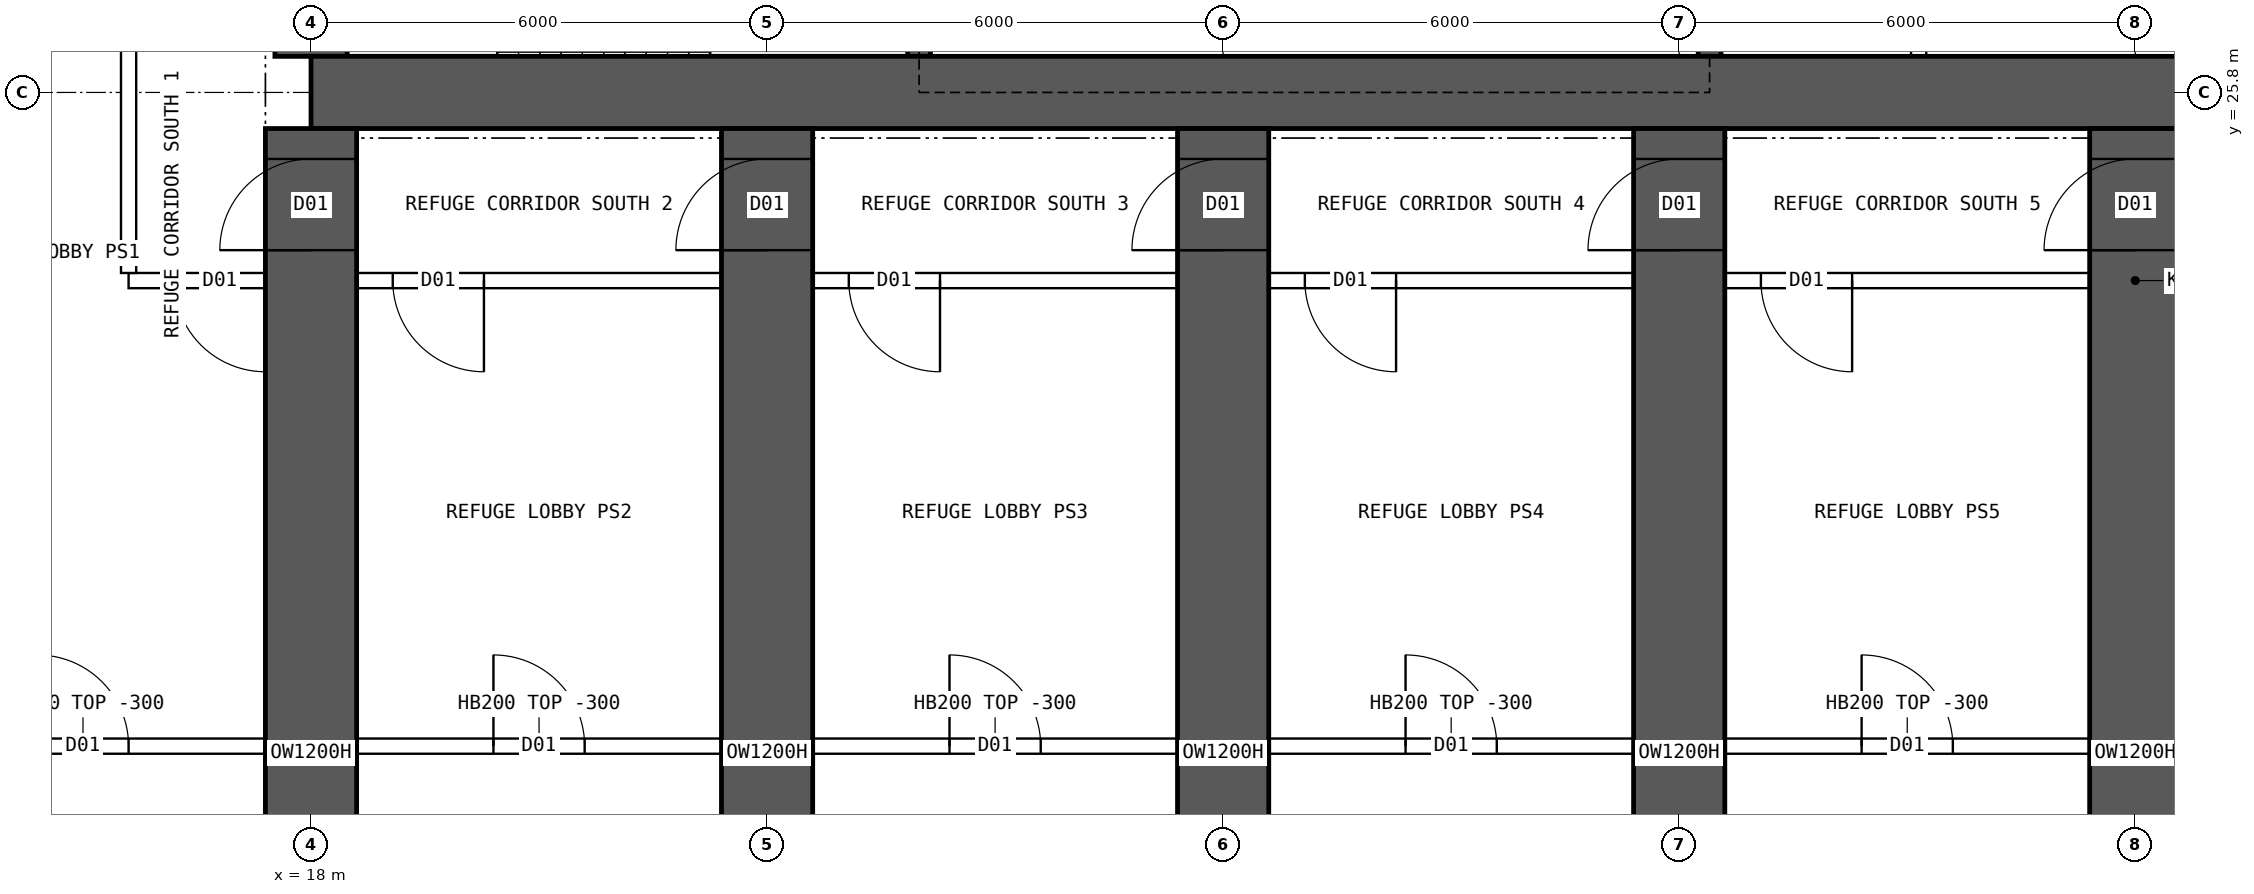
"""IFC4 building model, lengths in metres.
Left out: names, types, materials, properties, quantities, classifications, styles, units other than length and angle.
Written with IfcOpenShell. Run it as: python <this file> out.ifc"""

import sys

from ifc_helpers import new_model, si_unit, direction, frame, frame_2d, origin, place, context, subcontext, project, spatial, rectangle, extrude, element, fill, save


model = new_model("IFC4")
c1 = context("Model", 3, precision=1e-05, world=origin(), true_north=direction((0.0, 1.0)))
c2 = subcontext(c1, "Body", "Model", "MODEL_VIEW")
j1 = project(units=[si_unit("LENGTHUNIT", "METRE"), si_unit("PLANEANGLEUNIT", "RADIAN")], contexts=[c1])
p1 = place(None, origin())
s1 = spatial("IfcSite", under=j1, at=p1, CompositionType="ELEMENT")
p2 = place(p1, origin())
s2 = spatial("IfcBuilding", under=s1, at=p2, CompositionType="ELEMENT")
p3 = place(p2, frame((0.0, 0.0, 133.15)))
s3 = spatial("IfcBuildingStorey", under=s2, at=p3, CompositionType="ELEMENT", Elevation=133.15)
p4 = place(p3, frame((18.0, 25.8, 0.0), z_axis=(0.0, 0.0, 1.0), x_axis=(1.0, 0.0, 0.0)))
e1 = element("IfcWall", 1, at=p4, inside=s3, PredefinedType="SHEAR", context=c2, shape_type="SweptSolid", body=[
    extrude(rectangle(XDim=48.0, YDim=0.95, at=frame_2d((24.0, 0.0))), origin(), (0.0, 0.0, 1.0), 7.2),
])
p5 = place(p3, frame((18.0, 26.275, 0.0), z_axis=(0.0, 0.0, 1.0), x_axis=(0.0, 1.0, 0.0)))
e2 = element("IfcWall", 2, at=p5, inside=s3, PredefinedType="SHEAR", context=c2, shape_type="SweptSolid", body=[
    extrude(rectangle(XDim=11.45, YDim=0.95, at=frame_2d((5.725, 0.0))), origin(), (0.0, 0.0, 1.0), 7.2),
])
p6 = place(p5, frame((5.025, 0.0, 0.0)))
e3 = element("IfcOpeningElement", 3, at=p6, cuts=e2, PredefinedType="OPENING", context=c2, shape_type="SweptSolid", body=[
    extrude(rectangle(XDim=1.2, YDim=2.1, at=frame_2d((0.6, 1.05))), frame((0.0, 0.485, 0.0), z_axis=(0.0, -1.0, 0.0), x_axis=(1.0, 0.0, 0.0)), (0.0, 0.0, 1.0), 0.97),
])
for number, where, z_axis, x_axis in (
    (4, (26.0, 26.275, 0.0), (0.0, 0.0, 1.0), (0.0, 1.0, 0.0)),
    (5, (36.4, 26.275, 0.0), (0.0, 0.0, 1.0), (0.0, 1.0, 0.0)),
):
    element("IfcWall", number, at=place(p3, frame(where, z_axis=z_axis, x_axis=x_axis)), inside=s3, PredefinedType="SHEAR", context=c2, shape_type="SweptSolid", body=[
        extrude(rectangle(XDim=3.975, YDim=0.3, at=frame_2d((1.988, 0.0))), origin(), (0.0, 0.0, 1.0), 7.2),
    ])
p7 = place(p3, frame((18.0, 8.9, 0.0), z_axis=(0.0, 0.0, 1.0), x_axis=(0.0, 1.0, 0.0)))
e6 = element("IfcWall", 6, at=p7, inside=s3, PredefinedType="SHEAR", context=c2, shape_type="SweptSolid", body=[
    extrude(rectangle(XDim=16.425, YDim=1.2, at=frame_2d((8.212, 0.0))), origin(), (0.0, 0.0, 1.0), 7.2),
])
p8 = place(p7, frame((14.825, 0.0, 0.0)))
e7 = element("IfcOpeningElement", 7, at=p8, cuts=e6, PredefinedType="OPENING", context=c2, shape_type="SweptSolid", body=[
    extrude(rectangle(XDim=1.2, YDim=2.1, at=frame_2d((0.6, 1.05))), frame((0.0, 0.61, 0.0), z_axis=(0.0, -1.0, 0.0), x_axis=(1.0, 0.0, 0.0)), (0.0, 0.0, 1.0), 1.22),
])
p9 = place(p3, frame((24.0, 8.9, 0.0), z_axis=(0.0, 0.0, 1.0), x_axis=(0.0, 1.0, 0.0)))
e8 = element("IfcWall", 8, at=p9, inside=s3, PredefinedType="SHEAR", context=c2, shape_type="SweptSolid", body=[
    extrude(rectangle(XDim=16.425, YDim=1.2, at=frame_2d((8.212, 0.0))), origin(), (0.0, 0.0, 1.0), 7.2),
])
p10 = place(p9, frame((14.825, 0.0, 0.0)))
e9 = element("IfcOpeningElement", 9, at=p10, cuts=e8, PredefinedType="OPENING", context=c2, shape_type="SweptSolid", body=[
    extrude(rectangle(XDim=1.2, YDim=2.1, at=frame_2d((0.6, 1.05))), frame((0.0, 0.61, 0.0), z_axis=(0.0, -1.0, 0.0), x_axis=(1.0, 0.0, 0.0)), (0.0, 0.0, 1.0), 1.22),
])
p11 = place(p3, frame((30.0, 8.9, 0.0), z_axis=(0.0, 0.0, 1.0), x_axis=(0.0, 1.0, 0.0)))
e10 = element("IfcWall", 10, at=p11, inside=s3, PredefinedType="SHEAR", context=c2, shape_type="SweptSolid", body=[
    extrude(rectangle(XDim=16.425, YDim=1.2, at=frame_2d((8.212, 0.0))), origin(), (0.0, 0.0, 1.0), 7.2),
])
p12 = place(p11, frame((14.825, 0.0, 0.0)))
e11 = element("IfcOpeningElement", 11, at=p12, cuts=e10, PredefinedType="OPENING", context=c2, shape_type="SweptSolid", body=[
    extrude(rectangle(XDim=1.2, YDim=2.1, at=frame_2d((0.6, 1.05))), frame((0.0, 0.61, 0.0), z_axis=(0.0, -1.0, 0.0), x_axis=(1.0, 0.0, 0.0)), (0.0, 0.0, 1.0), 1.22),
])
p13 = place(p3, frame((36.0, 8.9, 0.0), z_axis=(0.0, 0.0, 1.0), x_axis=(0.0, 1.0, 0.0)))
e12 = element("IfcWall", 12, at=p13, inside=s3, PredefinedType="SHEAR", context=c2, shape_type="SweptSolid", body=[
    extrude(rectangle(XDim=16.425, YDim=1.2, at=frame_2d((8.212, 0.0))), origin(), (0.0, 0.0, 1.0), 7.2),
])
p14 = place(p13, frame((14.825, 0.0, 0.0)))
e13 = element("IfcOpeningElement", 13, at=p14, cuts=e12, PredefinedType="OPENING", context=c2, shape_type="SweptSolid", body=[
    extrude(rectangle(XDim=1.2, YDim=2.1, at=frame_2d((0.6, 1.05))), frame((0.0, 0.61, 0.0), z_axis=(0.0, -1.0, 0.0), x_axis=(1.0, 0.0, 0.0)), (0.0, 0.0, 1.0), 1.22),
])
p15 = place(p3, frame((42.0, 8.9, 0.0), z_axis=(0.0, 0.0, 1.0), x_axis=(0.0, 1.0, 0.0)))
e14 = element("IfcWall", 14, at=p15, inside=s3, PredefinedType="SHEAR", context=c2, shape_type="SweptSolid", body=[
    extrude(rectangle(XDim=16.425, YDim=1.2, at=frame_2d((8.212, 0.0))), origin(), (0.0, 0.0, 1.0), 7.2),
])
p16 = place(p15, frame((14.825, 0.0, 0.0)))
e15 = element("IfcOpeningElement", 15, at=p16, cuts=e14, PredefinedType="OPENING", context=c2, shape_type="SweptSolid", body=[
    extrude(rectangle(XDim=1.2, YDim=2.1, at=frame_2d((0.6, 1.05))), frame((0.0, 0.61, 0.0), z_axis=(0.0, -1.0, 0.0), x_axis=(1.0, 0.0, 0.0)), (0.0, 0.0, 1.0), 1.22),
])
p17 = place(p3, frame((39.15, 26.275, 0.0), z_axis=(0.0, 0.0, 1.0), x_axis=(0.0, 1.0, 0.0)))
e16 = element("IfcWall", 16, at=p17, inside=s3, PredefinedType="SOLIDWALL", context=c2, shape_type="SweptSolid", body=[
    extrude(rectangle(XDim=3.975, YDim=0.2, at=frame_2d((1.988, 0.0))), origin(), (0.0, 0.0, 1.0), 6.9),
])
p18 = place(p3, frame((68.4, 23.325, 0.0), z_axis=(0.0, 0.0, 1.0), x_axis=(-1.0, 0.0, 0.0)))
e17 = element("IfcWall", 17, at=p18, inside=s3, PredefinedType="SOLIDWALL", context=c2, shape_type="SweptSolid", body=[
    extrude(rectangle(XDim=52.8, YDim=0.2, at=frame_2d((26.4, 0.0))), origin(), (0.0, 0.0, 1.0), 6.9),
])
p19 = place(p18, frame((51.0, 0.0, 0.0)))
e18 = element("IfcOpeningElement", 18, at=p19, cuts=e17, PredefinedType="OPENING", context=c2, shape_type="SweptSolid", body=[
    extrude(rectangle(XDim=1.2, YDim=2.1, at=frame_2d((0.6, 1.05))), frame((0.0, 0.11, 0.0), z_axis=(0.0, -1.0, 0.0), x_axis=(1.0, 0.0, 0.0)), (0.0, 0.0, 1.0), 0.22),
])
p20 = place(p18, frame((48.125, 0.0, 0.0)))
e19 = element("IfcOpeningElement", 19, at=p20, cuts=e17, PredefinedType="OPENING", context=c2, shape_type="SweptSolid", body=[
    extrude(rectangle(XDim=1.2, YDim=2.1, at=frame_2d((0.6, 1.05))), frame((0.0, 0.11, 0.0), z_axis=(0.0, -1.0, 0.0), x_axis=(1.0, 0.0, 0.0)), (0.0, 0.0, 1.0), 0.22),
])
p21 = place(p18, frame((42.125, 0.0, 0.0)))
e20 = element("IfcOpeningElement", 20, at=p21, cuts=e17, PredefinedType="OPENING", context=c2, shape_type="SweptSolid", body=[
    extrude(rectangle(XDim=1.2, YDim=2.1, at=frame_2d((0.6, 1.05))), frame((0.0, 0.11, 0.0), z_axis=(0.0, -1.0, 0.0), x_axis=(1.0, 0.0, 0.0)), (0.0, 0.0, 1.0), 0.22),
])
p22 = place(p18, frame((36.125, 0.0, 0.0)))
e21 = element("IfcOpeningElement", 21, at=p22, cuts=e17, PredefinedType="OPENING", context=c2, shape_type="SweptSolid", body=[
    extrude(rectangle(XDim=1.2, YDim=2.1, at=frame_2d((0.6, 1.05))), frame((0.0, 0.11, 0.0), z_axis=(0.0, -1.0, 0.0), x_axis=(1.0, 0.0, 0.0)), (0.0, 0.0, 1.0), 0.22),
])
p23 = place(p18, frame((30.125, 0.0, 0.0)))
e22 = element("IfcOpeningElement", 22, at=p23, cuts=e17, PredefinedType="OPENING", context=c2, shape_type="SweptSolid", body=[
    extrude(rectangle(XDim=1.2, YDim=2.1, at=frame_2d((0.6, 1.05))), frame((0.0, 0.11, 0.0), z_axis=(0.0, -1.0, 0.0), x_axis=(1.0, 0.0, 0.0)), (0.0, 0.0, 1.0), 0.22),
])
p24 = place(p18, frame((24.125, 0.0, 0.0)))
e23 = element("IfcOpeningElement", 23, at=p24, cuts=e17, PredefinedType="OPENING", context=c2, shape_type="SweptSolid", body=[
    extrude(rectangle(XDim=1.2, YDim=2.1, at=frame_2d((0.6, 1.05))), frame((0.0, 0.11, 0.0), z_axis=(0.0, -1.0, 0.0), x_axis=(1.0, 0.0, 0.0)), (0.0, 0.0, 1.0), 0.22),
])
p25 = place(p18, frame((18.125, 0.0, 0.0)))
e24 = element("IfcOpeningElement", 24, at=p25, cuts=e17, PredefinedType="OPENING", context=c2, shape_type="SweptSolid", body=[
    extrude(rectangle(XDim=1.2, YDim=2.1, at=frame_2d((0.6, 1.05))), frame((0.0, 0.11, 0.0), z_axis=(0.0, -1.0, 0.0), x_axis=(1.0, 0.0, 0.0)), (0.0, 0.0, 1.0), 0.22),
])
p26 = place(p18, frame((12.125, 0.0, 0.0)))
e25 = element("IfcOpeningElement", 25, at=p26, cuts=e17, PredefinedType="OPENING", context=c2, shape_type="SweptSolid", body=[
    extrude(rectangle(XDim=1.2, YDim=2.1, at=frame_2d((0.6, 1.05))), frame((0.0, 0.11, 0.0), z_axis=(0.0, -1.0, 0.0), x_axis=(1.0, 0.0, 0.0)), (0.0, 0.0, 1.0), 0.22),
])
p27 = place(p18, frame((6.125, 0.0, 0.0)))
e26 = element("IfcOpeningElement", 26, at=p27, cuts=e17, PredefinedType="OPENING", context=c2, shape_type="SweptSolid", body=[
    extrude(rectangle(XDim=1.2, YDim=2.1, at=frame_2d((0.6, 1.05))), frame((0.0, 0.11, 0.0), z_axis=(0.0, -1.0, 0.0), x_axis=(1.0, 0.0, 0.0)), (0.0, 0.0, 1.0), 0.22),
])
p28 = place(p18, frame((0.125, 0.0, 0.0)))
e27 = element("IfcOpeningElement", 27, at=p28, cuts=e17, PredefinedType="OPENING", context=c2, shape_type="SweptSolid", body=[
    extrude(rectangle(XDim=1.2, YDim=2.1, at=frame_2d((0.6, 1.05))), frame((0.0, 0.11, 0.0), z_axis=(0.0, -1.0, 0.0), x_axis=(1.0, 0.0, 0.0)), (0.0, 0.0, 1.0), 0.22),
])
p29 = place(p3, frame((15.6, 23.425, 0.0), z_axis=(0.0, 0.0, 1.0), x_axis=(0.0, 1.0, 0.0)))
e28 = element("IfcWall", 28, at=p29, inside=s3, PredefinedType="SOLIDWALL", context=c2, shape_type="SweptSolid", body=[
    extrude(rectangle(XDim=17.15, YDim=0.2, at=frame_2d((8.575, 0.0))), origin(), (0.0, 0.0, 1.0), 6.9),
])
p30 = place(p3, frame((12.475, 17.2, 0.0), z_axis=(0.0, 0.0, 1.0), x_axis=(1.0, 0.0, 0.0)))
e29 = element("IfcWall", 29, at=p30, inside=s3, PredefinedType="SOLIDWALL", context=c2, shape_type="SweptSolid", body=[
    extrude(rectangle(XDim=5.05, YDim=0.2, at=frame_2d((2.525, 0.0))), origin(), (0.0, 0.0, 1.0), 6.9),
])
p31 = place(p30, frame((1.925, 0.0, 0.0)))
e30 = element("IfcOpeningElement", 30, at=p31, cuts=e29, PredefinedType="OPENING", context=c2, shape_type="SweptSolid", body=[
    extrude(rectangle(XDim=1.2, YDim=2.1, at=frame_2d((0.6, 1.05))), frame((0.0, 0.11, 0.0), z_axis=(0.0, -1.0, 0.0), x_axis=(1.0, 0.0, 0.0)), (0.0, 0.0, 1.0), 0.22),
])
p32 = place(p3, frame((18.475, 17.2, 0.0), z_axis=(0.0, 0.0, 1.0), x_axis=(1.0, 0.0, 0.0)))
e31 = element("IfcWall", 31, at=p32, inside=s3, PredefinedType="SOLIDWALL", context=c2, shape_type="SweptSolid", body=[
    extrude(rectangle(XDim=5.05, YDim=0.2, at=frame_2d((2.525, 0.0))), origin(), (0.0, 0.0, 1.0), 6.9),
])
p33 = place(p32, frame((1.925, 0.0, 0.0)))
e32 = element("IfcOpeningElement", 32, at=p33, cuts=e31, PredefinedType="OPENING", context=c2, shape_type="SweptSolid", body=[
    extrude(rectangle(XDim=1.2, YDim=2.1, at=frame_2d((0.6, 1.05))), frame((0.0, 0.11, 0.0), z_axis=(0.0, -1.0, 0.0), x_axis=(1.0, 0.0, 0.0)), (0.0, 0.0, 1.0), 0.22),
])
p34 = place(p3, frame((24.475, 17.2, 0.0), z_axis=(0.0, 0.0, 1.0), x_axis=(1.0, 0.0, 0.0)))
e33 = element("IfcWall", 33, at=p34, inside=s3, PredefinedType="SOLIDWALL", context=c2, shape_type="SweptSolid", body=[
    extrude(rectangle(XDim=5.05, YDim=0.2, at=frame_2d((2.525, 0.0))), origin(), (0.0, 0.0, 1.0), 6.9),
])
p35 = place(p34, frame((1.925, 0.0, 0.0)))
e34 = element("IfcOpeningElement", 34, at=p35, cuts=e33, PredefinedType="OPENING", context=c2, shape_type="SweptSolid", body=[
    extrude(rectangle(XDim=1.2, YDim=2.1, at=frame_2d((0.6, 1.05))), frame((0.0, 0.11, 0.0), z_axis=(0.0, -1.0, 0.0), x_axis=(1.0, 0.0, 0.0)), (0.0, 0.0, 1.0), 0.22),
])
p36 = place(p3, frame((30.475, 17.2, 0.0), z_axis=(0.0, 0.0, 1.0), x_axis=(1.0, 0.0, 0.0)))
e35 = element("IfcWall", 35, at=p36, inside=s3, PredefinedType="SOLIDWALL", context=c2, shape_type="SweptSolid", body=[
    extrude(rectangle(XDim=5.05, YDim=0.2, at=frame_2d((2.525, 0.0))), origin(), (0.0, 0.0, 1.0), 6.9),
])
p37 = place(p36, frame((1.925, 0.0, 0.0)))
e36 = element("IfcOpeningElement", 36, at=p37, cuts=e35, PredefinedType="OPENING", context=c2, shape_type="SweptSolid", body=[
    extrude(rectangle(XDim=1.2, YDim=2.1, at=frame_2d((0.6, 1.05))), frame((0.0, 0.11, 0.0), z_axis=(0.0, -1.0, 0.0), x_axis=(1.0, 0.0, 0.0)), (0.0, 0.0, 1.0), 0.22),
])
p38 = place(p3, frame((36.475, 17.2, 0.0), z_axis=(0.0, 0.0, 1.0), x_axis=(1.0, 0.0, 0.0)))
e37 = element("IfcWall", 37, at=p38, inside=s3, PredefinedType="SOLIDWALL", context=c2, shape_type="SweptSolid", body=[
    extrude(rectangle(XDim=5.05, YDim=0.2, at=frame_2d((2.525, 0.0))), origin(), (0.0, 0.0, 1.0), 6.9),
])
p39 = place(p38, frame((1.925, 0.0, 0.0)))
e38 = element("IfcOpeningElement", 38, at=p39, cuts=e37, PredefinedType="OPENING", context=c2, shape_type="SweptSolid", body=[
    extrude(rectangle(XDim=1.2, YDim=2.1, at=frame_2d((0.6, 1.05))), frame((0.0, 0.11, 0.0), z_axis=(0.0, -1.0, 0.0), x_axis=(1.0, 0.0, 0.0)), (0.0, 0.0, 1.0), 0.22),
])
p40 = place(p3, frame((42.475, 17.2, 0.0), z_axis=(0.0, 0.0, 1.0), x_axis=(1.0, 0.0, 0.0)))
e39 = element("IfcWall", 39, at=p40, inside=s3, PredefinedType="SOLIDWALL", context=c2, shape_type="SweptSolid", body=[
    extrude(rectangle(XDim=5.05, YDim=0.2, at=frame_2d((2.525, 0.0))), origin(), (0.0, 0.0, 1.0), 6.9),
])
p41 = place(p40, frame((1.925, 0.0, 0.0)))
e40 = element("IfcOpeningElement", 40, at=p41, cuts=e39, PredefinedType="OPENING", context=c2, shape_type="SweptSolid", body=[
    extrude(rectangle(XDim=1.2, YDim=2.1, at=frame_2d((0.6, 1.05))), frame((0.0, 0.11, 0.0), z_axis=(0.0, -1.0, 0.0), x_axis=(1.0, 0.0, 0.0)), (0.0, 0.0, 1.0), 0.22),
])
p42 = place(p31, origin())
e41 = element("IfcDoor", 41, at=p42, inside=s3, OperationType="SINGLE_SWING_LEFT", PredefinedType="DOOR", context=c2, shape_type="SweptSolid", body=[
    extrude(rectangle(XDim=1.2, YDim=2.1, at=frame_2d((0.6, 1.05))), frame((0.0, 0.025, 0.0), z_axis=(0.0, -1.0, 0.0), x_axis=(1.0, 0.0, 0.0)), (0.0, 0.0, 1.0), 0.05),
])
fill(e30, e41)
p43 = place(p33, origin())
e42 = element("IfcDoor", 42, at=p43, inside=s3, OperationType="SINGLE_SWING_LEFT", PredefinedType="DOOR", context=c2, shape_type="SweptSolid", body=[
    extrude(rectangle(XDim=1.2, YDim=2.1, at=frame_2d((0.6, 1.05))), frame((0.0, 0.025, 0.0), z_axis=(0.0, -1.0, 0.0), x_axis=(1.0, 0.0, 0.0)), (0.0, 0.0, 1.0), 0.05),
])
fill(e32, e42)
p44 = place(p35, origin())
e43 = element("IfcDoor", 43, at=p44, inside=s3, OperationType="SINGLE_SWING_LEFT", PredefinedType="DOOR", context=c2, shape_type="SweptSolid", body=[
    extrude(rectangle(XDim=1.2, YDim=2.1, at=frame_2d((0.6, 1.05))), frame((0.0, 0.025, 0.0), z_axis=(0.0, -1.0, 0.0), x_axis=(1.0, 0.0, 0.0)), (0.0, 0.0, 1.0), 0.05),
])
fill(e34, e43)
p45 = place(p37, origin())
e44 = element("IfcDoor", 44, at=p45, inside=s3, OperationType="SINGLE_SWING_LEFT", PredefinedType="DOOR", context=c2, shape_type="SweptSolid", body=[
    extrude(rectangle(XDim=1.2, YDim=2.1, at=frame_2d((0.6, 1.05))), frame((0.0, 0.025, 0.0), z_axis=(0.0, -1.0, 0.0), x_axis=(1.0, 0.0, 0.0)), (0.0, 0.0, 1.0), 0.05),
])
fill(e36, e44)
p46 = place(p39, origin())
e45 = element("IfcDoor", 45, at=p46, inside=s3, OperationType="SINGLE_SWING_LEFT", PredefinedType="DOOR", context=c2, shape_type="SweptSolid", body=[
    extrude(rectangle(XDim=1.2, YDim=2.1, at=frame_2d((0.6, 1.05))), frame((0.0, 0.025, 0.0), z_axis=(0.0, -1.0, 0.0), x_axis=(1.0, 0.0, 0.0)), (0.0, 0.0, 1.0), 0.05),
])
fill(e38, e45)
p47 = place(p19, origin())
e46 = element("IfcDoor", 46, at=p47, inside=s3, OperationType="SINGLE_SWING_LEFT", PredefinedType="DOOR", context=c2, shape_type="SweptSolid", body=[
    extrude(rectangle(XDim=1.2, YDim=2.1, at=frame_2d((0.6, 1.05))), frame((0.0, 0.025, 0.0), z_axis=(0.0, -1.0, 0.0), x_axis=(1.0, 0.0, 0.0)), (0.0, 0.0, 1.0), 0.05),
])
fill(e18, e46)
p48 = place(p20, origin())
e47 = element("IfcDoor", 47, at=p48, inside=s3, OperationType="SINGLE_SWING_LEFT", PredefinedType="DOOR", context=c2, shape_type="SweptSolid", body=[
    extrude(rectangle(XDim=1.2, YDim=2.1, at=frame_2d((0.6, 1.05))), frame((0.0, 0.025, 0.0), z_axis=(0.0, -1.0, 0.0), x_axis=(1.0, 0.0, 0.0)), (0.0, 0.0, 1.0), 0.05),
])
fill(e19, e47)
p49 = place(p21, origin())
e48 = element("IfcDoor", 48, at=p49, inside=s3, OperationType="SINGLE_SWING_LEFT", PredefinedType="DOOR", context=c2, shape_type="SweptSolid", body=[
    extrude(rectangle(XDim=1.2, YDim=2.1, at=frame_2d((0.6, 1.05))), frame((0.0, 0.025, 0.0), z_axis=(0.0, -1.0, 0.0), x_axis=(1.0, 0.0, 0.0)), (0.0, 0.0, 1.0), 0.05),
])
fill(e20, e48)
p50 = place(p22, origin())
e49 = element("IfcDoor", 49, at=p50, inside=s3, OperationType="SINGLE_SWING_LEFT", PredefinedType="DOOR", context=c2, shape_type="SweptSolid", body=[
    extrude(rectangle(XDim=1.2, YDim=2.1, at=frame_2d((0.6, 1.05))), frame((0.0, 0.025, 0.0), z_axis=(0.0, -1.0, 0.0), x_axis=(1.0, 0.0, 0.0)), (0.0, 0.0, 1.0), 0.05),
])
fill(e21, e49)
p51 = place(p23, origin())
e50 = element("IfcDoor", 50, at=p51, inside=s3, OperationType="SINGLE_SWING_LEFT", PredefinedType="DOOR", context=c2, shape_type="SweptSolid", body=[
    extrude(rectangle(XDim=1.2, YDim=2.1, at=frame_2d((0.6, 1.05))), frame((0.0, 0.025, 0.0), z_axis=(0.0, -1.0, 0.0), x_axis=(1.0, 0.0, 0.0)), (0.0, 0.0, 1.0), 0.05),
])
fill(e22, e50)
p52 = place(p8, origin())
e51 = element("IfcDoor", 51, at=p52, inside=s3, OperationType="SINGLE_SWING_LEFT", PredefinedType="DOOR", context=c2, shape_type="SweptSolid", body=[
    extrude(rectangle(XDim=1.2, YDim=2.1, at=frame_2d((0.6, 1.05))), frame((0.0, 0.025, 0.0), z_axis=(0.0, -1.0, 0.0), x_axis=(1.0, 0.0, 0.0)), (0.0, 0.0, 1.0), 0.05),
])
fill(e7, e51)
p53 = place(p10, origin())
e52 = element("IfcDoor", 52, at=p53, inside=s3, OperationType="SINGLE_SWING_LEFT", PredefinedType="DOOR", context=c2, shape_type="SweptSolid", body=[
    extrude(rectangle(XDim=1.2, YDim=2.1, at=frame_2d((0.6, 1.05))), frame((0.0, 0.025, 0.0), z_axis=(0.0, -1.0, 0.0), x_axis=(1.0, 0.0, 0.0)), (0.0, 0.0, 1.0), 0.05),
])
fill(e9, e52)
p54 = place(p12, origin())
e53 = element("IfcDoor", 53, at=p54, inside=s3, OperationType="SINGLE_SWING_LEFT", PredefinedType="DOOR", context=c2, shape_type="SweptSolid", body=[
    extrude(rectangle(XDim=1.2, YDim=2.1, at=frame_2d((0.6, 1.05))), frame((0.0, 0.025, 0.0), z_axis=(0.0, -1.0, 0.0), x_axis=(1.0, 0.0, 0.0)), (0.0, 0.0, 1.0), 0.05),
])
fill(e11, e53)
p55 = place(p14, origin())
e54 = element("IfcDoor", 54, at=p55, inside=s3, OperationType="SINGLE_SWING_LEFT", PredefinedType="DOOR", context=c2, shape_type="SweptSolid", body=[
    extrude(rectangle(XDim=1.2, YDim=2.1, at=frame_2d((0.6, 1.05))), frame((0.0, 0.025, 0.0), z_axis=(0.0, -1.0, 0.0), x_axis=(1.0, 0.0, 0.0)), (0.0, 0.0, 1.0), 0.05),
])
fill(e13, e54)
p56 = place(p16, origin())
e55 = element("IfcDoor", 55, at=p56, inside=s3, OperationType="SINGLE_SWING_LEFT", PredefinedType="DOOR", context=c2, shape_type="SweptSolid", body=[
    extrude(rectangle(XDim=1.2, YDim=2.1, at=frame_2d((0.6, 1.05))), frame((0.0, 0.025, 0.0), z_axis=(0.0, -1.0, 0.0), x_axis=(1.0, 0.0, 0.0)), (0.0, 0.0, 1.0), 0.05),
])
fill(e15, e55)
save(model, sys.argv[1])
